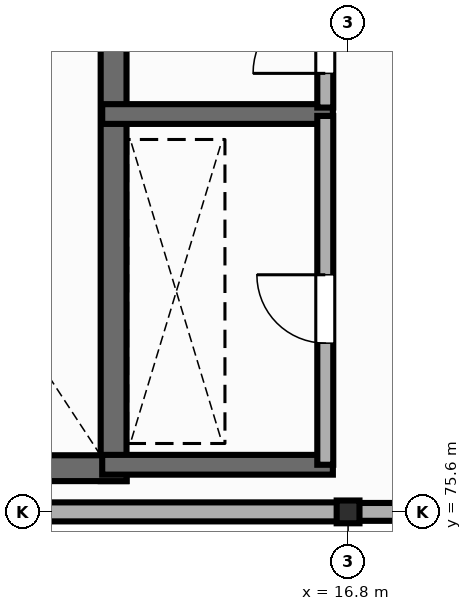
"""IFC4 building model, lengths in metres.
Left out: names, types, materials, properties, quantities, classifications, styles, units other than length and angle.
Written with IfcOpenShell. Run it as: python <this file> out.ifc"""

import sys

from ifc_helpers import new_model, si_unit, direction, frame, frame_2d, origin, origin_2d, place, context, subcontext, project, spatial, rectangle, i_section, extrude, element, fill, save


model = new_model("IFC4")
c1 = context("Model", 3, precision=1e-05, world=origin(), true_north=direction((0.0, 1.0)))
c2 = subcontext(c1, "Body", "Model", "MODEL_VIEW")
j1 = project(units=[si_unit("LENGTHUNIT", "METRE"), si_unit("PLANEANGLEUNIT", "RADIAN")], contexts=[c1])
p1 = place(None, origin())
s1 = spatial("IfcSite", under=j1, at=p1, CompositionType="ELEMENT")
p2 = place(p1, origin())
s2 = spatial("IfcBuilding", under=s1, at=p2, CompositionType="ELEMENT")
p3 = place(p2, frame((0.0, 0.0, 18.0)))
s3 = spatial("IfcBuildingStorey", under=s2, at=p3, CompositionType="ELEMENT", Elevation=18.0)
p4 = place(p3, frame((16.8, 75.6, 0.0), z_axis=(0.0, 0.0, 1.0), x_axis=(1.0, 0.0, 0.0)))
e1 = element("IfcColumn", 1, at=p4, inside=s3, PredefinedType="COLUMN", context=c2, shape_type="SweptSolid", body=[
    extrude(i_section(OverallWidth=0.3, OverallDepth=0.3, WebThickness=0.011, FlangeThickness=0.019, FilletRadius=0.027, at=origin_2d()), origin(), (0.0, 0.0, 1.0), 4.05),
])
p5 = place(p3, frame((8.408, 75.6, 0.0), z_axis=(0.0, 0.0, 1.0), x_axis=(1.0, 0.0, 0.0)))
e2 = element("IfcWall", 2, at=p5, inside=s3, PredefinedType="STANDARD", context=c2, shape_type="SweptSolid", body=[
    extrude(rectangle(XDim=8.384, YDim=0.25, at=frame_2d((4.192, 0.0))), origin(), (0.0, 0.0, 1.0), 3.472),
])
p6 = place(p3, frame((16.808, 75.6, 0.0), z_axis=(0.0, 0.0, 1.0), x_axis=(1.0, 0.0, 0.0)))
e3 = element("IfcWall", 3, at=p6, inside=s3, PredefinedType="STANDARD", context=c2, shape_type="SweptSolid", body=[
    extrude(rectangle(XDim=8.384, YDim=0.235, at=frame_2d((4.192, 0.0))), origin(), (0.0, 0.0, 1.0), 3.502),
])
p7 = place(p3, frame((13.715, 76.005, 0.0), z_axis=(0.0, 0.0, 1.0), x_axis=(0.0, 1.0, 0.0)))
e4 = element("IfcWall", 4, at=p7, inside=s3, PredefinedType="SHEAR", context=c2, shape_type="SweptSolid", body=[
    extrude(rectangle(XDim=9.99, YDim=0.34, at=frame_2d((4.995, 0.0))), origin(), (0.0, 0.0, 1.0), 3.85),
])
p8 = place(p3, frame((8.635, 76.175, 0.0), z_axis=(0.0, 0.0, 1.0), x_axis=(1.0, 0.0, 0.0)))
e5 = element("IfcWall", 5, at=p8, inside=s3, PredefinedType="SHEAR", context=c2, shape_type="SweptSolid", body=[
    extrude(rectangle(XDim=5.25, YDim=0.34, at=frame_2d((2.625, 0.0))), origin(), (0.0, 0.0, 1.0), 3.85),
])
for number, where, z_axis, x_axis in (
    (6, (13.565, 76.22, 0.0), (0.0, 0.0, 1.0), (1.0, 0.0, 0.0)),
    (7, (13.565, 80.835, 0.0), (0.0, 0.0, 1.0), (1.0, 0.0, 0.0)),
):
    element("IfcWall", number, at=place(p3, frame(where, z_axis=z_axis, x_axis=x_axis)), inside=s3, PredefinedType="SHEAR", context=c2, shape_type="SweptSolid", body=[
        extrude(rectangle(XDim=3.035, YDim=0.26, at=frame_2d((1.518, 0.0))), origin(), (0.0, 0.0, 1.0), 3.85),
    ])
p9 = place(p3, frame((16.5, 76.22, 0.0), z_axis=(0.0, 0.0, 1.0), x_axis=(0.0, 1.0, 0.0)))
e8 = element("IfcWall", 8, at=p9, inside=s3, PredefinedType="STANDARD", context=c2, shape_type="SweptSolid", body=[
    extrude(rectangle(XDim=4.59, YDim=0.21, at=frame_2d((2.295, 0.0))), origin(), (0.0, 0.0, 1.0), 3.562),
])
p10 = place(p9, frame((1.6, 0.0, 0.0)))
e9 = element("IfcOpeningElement", 9, at=p10, cuts=e8, PredefinedType="OPENING", context=c2, shape_type="SweptSolid", body=[
    extrude(rectangle(XDim=0.9, YDim=2.1, at=frame_2d((0.45, 1.05))), frame((0.0, 0.115, 0.0), z_axis=(0.0, -1.0, 0.0), x_axis=(1.0, 0.0, 0.0)), (0.0, 0.0, 1.0), 0.23),
])
p11 = place(p3, frame((16.5, 80.92, 0.0), z_axis=(0.0, 0.0, 1.0), x_axis=(0.0, 1.0, 0.0)))
e10 = element("IfcWall", 10, at=p11, inside=s3, PredefinedType="STANDARD", context=c2, shape_type="SweptSolid", body=[
    extrude(rectangle(XDim=4.48, YDim=0.21, at=frame_2d((2.24, 0.0))), origin(), (0.0, 0.0, 1.0), 3.472),
])
p12 = place(p11, frame((0.45, 0.0, 0.0)))
e11 = element("IfcOpeningElement", 11, at=p12, cuts=e10, PredefinedType="OPENING", context=c2, shape_type="SweptSolid", body=[
    extrude(rectangle(XDim=0.95, YDim=2.15, at=frame_2d((0.475, 1.075))), frame((0.0, 0.115, 0.0), z_axis=(0.0, -1.0, 0.0), x_axis=(1.0, 0.0, 0.0)), (0.0, 0.0, 1.0), 0.23),
])
p13 = place(p10, origin())
e12 = element("IfcDoor", 12, at=p13, inside=s3, OperationType="SINGLE_SWING_RIGHT", PredefinedType="DOOR", context=c2, shape_type="SweptSolid", body=[
    extrude(rectangle(XDim=0.9, YDim=2.1, at=frame_2d((0.45, 1.05))), frame((0.0, 0.025, 0.0), z_axis=(0.0, -1.0, 0.0), x_axis=(1.0, 0.0, 0.0)), (0.0, 0.0, 1.0), 0.05),
])
fill(e9, e12)
p14 = place(p12, origin())
e13 = element("IfcDoor", 13, at=p14, inside=s3, OperationType="SINGLE_SWING_LEFT", PredefinedType="DOOR", context=c2, shape_type="SweptSolid", body=[
    extrude(rectangle(XDim=0.95, YDim=2.15, at=frame_2d((0.475, 1.075))), frame((0.0, 0.025, 0.0), z_axis=(0.0, -1.0, 0.0), x_axis=(1.0, 0.0, 0.0)), (0.0, 0.0, 1.0), 0.05),
])
fill(e11, e13)
save(model, sys.argv[1])
